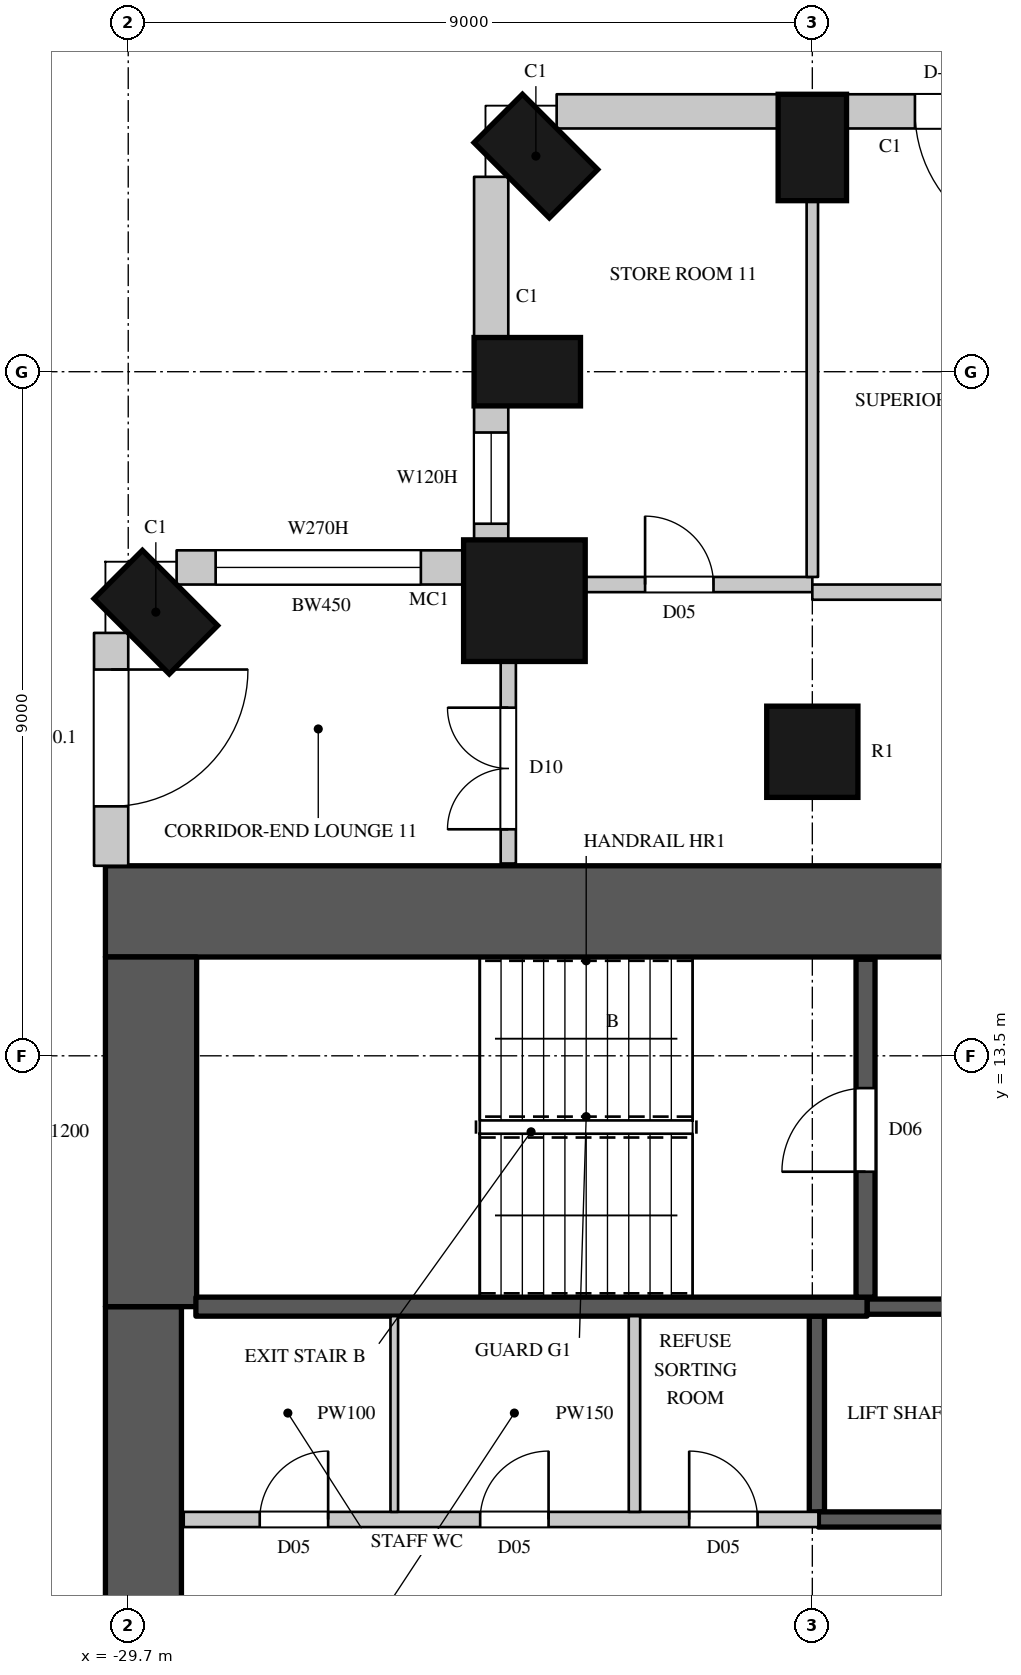
"""IFC4 building model, lengths in metres.
Left out: names, types, materials, properties, quantities, classifications, styles, units other than length and angle.
Written with IfcOpenShell. Run it as: python <this file> out.ifc"""

import sys

from ifc_helpers import new_model, si_unit, direction, frame, frame_2d, origin, origin_2d, place, context, subcontext, project, spatial, rectangle, circle, extrude, element, fill, save


model = new_model("IFC4")
c1 = context("Model", 3, precision=1e-05, world=origin(), true_north=direction((0.0, 1.0)))
c2 = subcontext(c1, "Body", "Model", "MODEL_VIEW")
j1 = project(units=[si_unit("LENGTHUNIT", "METRE"), si_unit("PLANEANGLEUNIT", "RADIAN")], contexts=[c1])
p1 = place(None, origin())
s1 = spatial("IfcSite", under=j1, at=p1, CompositionType="ELEMENT")
p2 = place(p1, origin())
s2 = spatial("IfcBuilding", under=s1, at=p2, CompositionType="ELEMENT")
p3 = place(p2, frame((0.0, 0.0, 69.9)))
s3 = spatial("IfcBuildingStorey", under=s2, at=p3, CompositionType="ELEMENT", Elevation=69.9)
for number, where, z_axis, x_axis in (
    (1, (-29.337, 19.337, 0.0), (0.0, 0.0, 1.0), (-0.707, -0.707, 0.0)),
    (2, (-20.7, 25.45, 0.0), (0.0, 0.0, 1.0), (-1.0, 0.0, 0.0)),
    (3, (-24.337, 25.337, 0.0), (0.0, 0.0, 1.0), (-0.707, -0.707, 0.0)),
    (4, (-24.45, 22.5, 0.0), (0.0, 0.0, 1.0), (0.0, -1.0, 0.0)),
):
    element("IfcColumn", number, at=place(p3, frame(where, z_axis=z_axis, x_axis=x_axis)), inside=s3, PredefinedType="COLUMN", context=c2, shape_type="SweptSolid", body=[
        extrude(rectangle(XDim=0.9, YDim=1.4, at=origin_2d()), origin(), (0.0, 0.0, 1.0), 3.6),
    ])
p4 = place(p3, frame((-24.488, 19.488, 0.0), z_axis=(0.0, 0.0, 1.0), x_axis=(1.0, 0.0, 0.0)))
e5 = element("IfcColumn", 5, at=p4, inside=s3, PredefinedType="COLUMN", context=c2, shape_type="SweptSolid", body=[
    extrude(circle(Radius=0.8, at=origin_2d()), origin(), (0.0, 0.0, 1.0), 3.6),
])
p5 = place(p3, frame((-20.7, 17.5, 0.0), z_axis=(0.0, 0.0, 1.0), x_axis=(1.0, 0.0, 0.0)))
e6 = element("IfcColumn", 6, at=p5, inside=s3, PredefinedType="COLUMN", context=c2, shape_type="SweptSolid", body=[
    extrude(circle(Radius=0.6, at=origin_2d()), origin(), (0.0, 0.0, 1.0), 3.6),
])
p6 = place(p3, frame((-29.925, 19.064, 0.0), z_axis=(0.0, 0.0, 1.0), x_axis=(0.0, -1.0, 0.0)))
e7 = element("IfcWall", 7, at=p6, inside=s3, PredefinedType="SOLIDWALL", context=c2, shape_type="SweptSolid", body=[
    extrude(rectangle(XDim=3.064, YDim=0.45, at=frame_2d((1.532, 0.0))), origin(), (0.0, 0.0, 1.0), 3.3),
])
p7 = place(p6, frame((0.482, 0.0, 0.0)))
e8 = element("IfcOpeningElement", 8, at=p7, cuts=e7, PredefinedType="OPENING", context=c2, shape_type="SweptSolid", body=[
    extrude(rectangle(XDim=1.8, YDim=2.4, at=frame_2d((0.9, 1.2))), frame((0.0, 0.235, 0.0), z_axis=(0.0, -1.0, 0.0), x_axis=(1.0, 0.0, 0.0)), (0.0, 0.0, 1.0), 0.47),
])
p8 = place(p3, frame((-12.15, 25.925, 0.0), z_axis=(0.0, 0.0, 1.0), x_axis=(-1.0, 0.0, 0.0)))
e9 = element("IfcWall", 9, at=p8, inside=s3, PredefinedType="SOLIDWALL", context=c2, shape_type="SweptSolid", body=[
    extrude(rectangle(XDim=8.1, YDim=0.45, at=frame_2d((4.05, 0.0))), origin(), (0.0, 0.0, 1.0), 3.3),
])
p9 = place(p8, frame((0.2, 0.0, 0.0)))
e10 = element("IfcOpeningElement", 10, at=p9, cuts=e9, PredefinedType="OPENING", context=c2, shape_type="SweptSolid", body=[
    extrude(rectangle(XDim=1.8, YDim=2.4, at=frame_2d((0.9, 1.2))), frame((0.0, 0.235, 0.0), z_axis=(0.0, -1.0, 0.0), x_axis=(1.0, 0.0, 0.0)), (0.0, 0.0, 1.0), 0.47),
])
p10 = place(p8, frame((2.2, 0.0, 1.05)))
e11 = element("IfcOpeningElement", 11, at=p10, cuts=e9, PredefinedType="OPENING", context=c2, shape_type="SweptSolid", body=[
    extrude(rectangle(XDim=1.2, YDim=2.0, at=frame_2d((0.6, 1.0))), frame((0.0, 0.235, 0.0), z_axis=(0.0, -1.0, 0.0), x_axis=(1.0, 0.0, 0.0)), (0.0, 0.0, 1.0), 0.47),
])
p11 = place(p8, frame((5.4, 0.0, 0.0)))
e12 = element("IfcOpeningElement", 12, at=p11, cuts=e9, PredefinedType="OPENING", context=c2, shape_type="SweptSolid", body=[
    extrude(rectangle(XDim=1.8, YDim=2.4, at=frame_2d((0.9, 1.2))), frame((0.0, 0.235, 0.0), z_axis=(0.0, -1.0, 0.0), x_axis=(1.0, 0.0, 0.0)), (0.0, 0.0, 1.0), 0.47),
])
p12 = place(p3, frame((-21.15, 25.925, 0.0), z_axis=(0.0, 0.0, 1.0), x_axis=(-1.0, 0.0, 0.0)))
e13 = element("IfcWall", 13, at=p12, inside=s3, PredefinedType="SOLIDWALL", context=c2, shape_type="SweptSolid", body=[
    extrude(rectangle(XDim=2.914, YDim=0.45, at=frame_2d((1.457, 0.0))), origin(), (0.0, 0.0, 1.0), 3.3),
])
p13 = place(p3, frame((-24.925, 25.064, 0.0), z_axis=(0.0, 0.0, 1.0), x_axis=(0.0, -1.0, 0.0)))
e14 = element("IfcWall", 14, at=p13, inside=s3, PredefinedType="SOLIDWALL", context=c2, shape_type="SweptSolid", body=[
    extrude(rectangle(XDim=2.114, YDim=0.45, at=frame_2d((1.057, 0.0))), origin(), (0.0, 0.0, 1.0), 3.3),
])
p14 = place(p3, frame((-24.925, 22.05, 0.0), z_axis=(0.0, 0.0, 1.0), x_axis=(0.0, -1.0, 0.0)))
e15 = element("IfcWall", 15, at=p14, inside=s3, PredefinedType="SOLIDWALL", context=c2, shape_type="SweptSolid", body=[
    extrude(rectangle(XDim=1.792, YDim=0.45, at=frame_2d((0.896, 0.0))), origin(), (0.0, 0.0, 1.0), 3.3),
])
p15 = place(p14, frame((0.35, 0.0, 1.05)))
e16 = element("IfcOpeningElement", 16, at=p15, cuts=e15, PredefinedType="OPENING", context=c2, shape_type="SweptSolid", body=[
    extrude(rectangle(XDim=1.2, YDim=2.0, at=frame_2d((0.6, 1.0))), frame((0.0, 0.235, 0.0), z_axis=(0.0, -1.0, 0.0), x_axis=(1.0, 0.0, 0.0)), (0.0, 0.0, 1.0), 0.47),
])
p16 = place(p3, frame((-25.259, 19.925, 0.0), z_axis=(0.0, 0.0, 1.0), x_axis=(-1.0, 0.0, 0.0)))
e17 = element("IfcWall", 17, at=p16, inside=s3, PredefinedType="SOLIDWALL", context=c2, shape_type="SweptSolid", body=[
    extrude(rectangle(XDim=3.805, YDim=0.45, at=frame_2d((1.903, 0.0))), origin(), (0.0, 0.0, 1.0), 3.3),
])
p17 = place(p16, frame((0.592, 0.0, 1.05)))
e18 = element("IfcOpeningElement", 18, at=p17, cuts=e17, PredefinedType="OPENING", context=c2, shape_type="SweptSolid", body=[
    extrude(rectangle(XDim=2.7, YDim=2.0, at=frame_2d((1.35, 1.0))), frame((0.0, 0.235, 0.0), z_axis=(0.0, -1.0, 0.0), x_axis=(1.0, 0.0, 0.0)), (0.0, 0.0, 1.0), 0.47),
])
p18 = place(p3, frame((-30.0, 15.4, 0.0), z_axis=(0.0, 0.0, 1.0), x_axis=(1.0, 0.0, 0.0)))
e19 = element("IfcWall", 19, at=p18, inside=s3, PredefinedType="SHEAR", context=c2, shape_type="SweptSolid", body=[
    extrude(rectangle(XDim=16.0, YDim=1.2, at=frame_2d((8.0, 0.0))), origin(), (0.0, 0.0, 1.0), 3.6),
])
p19 = place(p18, frame((13.4, 0.0, 0.0)))
e20 = element("IfcOpeningElement", 20, at=p19, cuts=e19, PredefinedType="OPENING", context=c2, shape_type="SweptSolid", body=[
    extrude(rectangle(XDim=1.5, YDim=2.4, at=frame_2d((0.75, 1.2))), frame((0.0, 0.61, 0.0), z_axis=(0.0, -1.0, 0.0), x_axis=(1.0, 0.0, 0.0)), (0.0, 0.0, 1.0), 1.22),
])
p20 = place(p3, frame((-29.5, -10.2, 0.0), z_axis=(0.0, 0.0, 1.0), x_axis=(0.0, 1.0, 0.0)))
e21 = element("IfcWall", 21, at=p20, inside=s3, PredefinedType="SHEAR", context=c2, shape_type="SweptSolid", body=[
    extrude(rectangle(XDim=20.4, YDim=1.0, at=frame_2d((10.2, 0.0))), origin(), (0.0, 0.0, 1.0), 3.6),
])
p21 = place(p3, frame((-29.4, 10.2, 0.0), z_axis=(0.0, 0.0, 1.0), x_axis=(0.0, 1.0, 0.0)))
e22 = element("IfcWall", 22, at=p21, inside=s3, PredefinedType="SHEAR", context=c2, shape_type="SweptSolid", body=[
    extrude(rectangle(XDim=4.6, YDim=1.2, at=frame_2d((2.3, 0.0))), origin(), (0.0, 0.0, 1.0), 3.6),
])
p22 = place(p3, frame((-28.97, 7.4, 0.0), z_axis=(0.0, 0.0, 1.0), x_axis=(1.0, 0.0, 0.0)))
e23 = element("IfcWall", 23, at=p22, inside=s3, PredefinedType="PARTITIONING", context=c2, shape_type="SweptSolid", body=[
    extrude(rectangle(XDim=8.35, YDim=0.2, at=frame_2d((4.175, 0.0))), origin(), (0.0, 0.0, 1.0), 3.3),
])
p23 = place(p22, frame((1.0, 0.0, 0.0)))
e24 = element("IfcOpeningElement", 24, at=p23, cuts=e23, PredefinedType="OPENING", context=c2, shape_type="SweptSolid", body=[
    extrude(rectangle(XDim=0.9, YDim=2.2, at=frame_2d((0.45, 1.1))), frame((0.0, 0.11, 0.0), z_axis=(0.0, -1.0, 0.0), x_axis=(1.0, 0.0, 0.0)), (0.0, 0.0, 1.0), 0.22),
])
p24 = place(p22, frame((3.9, 0.0, 0.0)))
e25 = element("IfcOpeningElement", 25, at=p24, cuts=e23, PredefinedType="OPENING", context=c2, shape_type="SweptSolid", body=[
    extrude(rectangle(XDim=0.9, YDim=2.2, at=frame_2d((0.45, 1.1))), frame((0.0, 0.11, 0.0), z_axis=(0.0, -1.0, 0.0), x_axis=(1.0, 0.0, 0.0)), (0.0, 0.0, 1.0), 0.22),
])
p25 = place(p22, frame((6.65, 0.0, 0.0)))
e26 = element("IfcOpeningElement", 26, at=p25, cuts=e23, PredefinedType="OPENING", context=c2, shape_type="SweptSolid", body=[
    extrude(rectangle(XDim=0.9, YDim=2.2, at=frame_2d((0.45, 1.1))), frame((0.0, 0.11, 0.0), z_axis=(0.0, -1.0, 0.0), x_axis=(1.0, 0.0, 0.0)), (0.0, 0.0, 1.0), 0.22),
])
p26 = place(p3, frame((-24.7, 16.03, 0.0), z_axis=(0.0, 0.0, 1.0), x_axis=(0.0, 1.0, 0.0)))
e27 = element("IfcWall", 27, at=p26, inside=s3, PredefinedType="PARTITIONING", context=c2, shape_type="SweptSolid", body=[
    extrude(rectangle(XDim=2.67, YDim=0.2, at=frame_2d((1.335, 0.0))), origin(), (0.0, 0.0, 1.0), 3.3),
])
p27 = place(p26, frame((0.45, 0.0, 0.0)))
e28 = element("IfcOpeningElement", 28, at=p27, cuts=e27, PredefinedType="OPENING", context=c2, shape_type="SweptSolid", body=[
    extrude(rectangle(XDim=1.6, YDim=2.4, at=frame_2d((0.8, 1.2))), frame((0.0, 0.11, 0.0), z_axis=(0.0, -1.0, 0.0), x_axis=(1.0, 0.0, 0.0)), (0.0, 0.0, 1.0), 0.22),
])
p28 = place(p3, frame((-23.7, 19.7, 0.0), z_axis=(0.0, 0.0, 1.0), x_axis=(1.0, 0.0, 0.0)))
e29 = element("IfcWall", 29, at=p28, inside=s3, PredefinedType="PARTITIONING", context=c2, shape_type="SweptSolid", body=[
    extrude(rectangle(XDim=3.0, YDim=0.2, at=frame_2d((1.5, 0.0))), origin(), (0.0, 0.0, 1.0), 3.3),
])
p29 = place(p28, frame((0.8, 0.0, 0.0)))
e30 = element("IfcOpeningElement", 30, at=p29, cuts=e29, PredefinedType="OPENING", context=c2, shape_type="SweptSolid", body=[
    extrude(rectangle(XDim=0.9, YDim=2.2, at=frame_2d((0.45, 1.1))), frame((0.0, 0.11, 0.0), z_axis=(0.0, -1.0, 0.0), x_axis=(1.0, 0.0, 0.0)), (0.0, 0.0, 1.0), 0.22),
])
p30 = place(p3, frame((-20.7, 19.6, 0.0), z_axis=(0.0, 0.0, 1.0), x_axis=(1.0, 0.0, 0.0)))
e31 = element("IfcWall", 31, at=p30, inside=s3, PredefinedType="PARTITIONING", context=c2, shape_type="SweptSolid", body=[
    extrude(rectangle(XDim=38.184, YDim=0.2, at=frame_2d((19.092, 0.0))), origin(), (0.0, 0.0, 1.0), 3.3),
])
p31 = place(p30, frame((3.15, 0.0, 0.0)))
e32 = element("IfcOpeningElement", 32, at=p31, cuts=e31, PredefinedType="OPENING", context=c2, shape_type="SweptSolid", body=[
    extrude(rectangle(XDim=0.95, YDim=2.2, at=frame_2d((0.475, 1.1))), frame((0.0, 0.11, 0.0), z_axis=(0.0, -1.0, 0.0), x_axis=(1.0, 0.0, 0.0)), (0.0, 0.0, 1.0), 0.22),
])
p32 = place(p30, frame((13.9, 0.0, 0.0)))
e33 = element("IfcOpeningElement", 33, at=p32, cuts=e31, PredefinedType="OPENING", context=c2, shape_type="SweptSolid", body=[
    extrude(rectangle(XDim=0.95, YDim=2.2, at=frame_2d((0.475, 1.1))), frame((0.0, 0.11, 0.0), z_axis=(0.0, -1.0, 0.0), x_axis=(1.0, 0.0, 0.0)), (0.0, 0.0, 1.0), 0.22),
])
p33 = place(p30, frame((21.15, 0.0, 0.0)))
e34 = element("IfcOpeningElement", 34, at=p33, cuts=e31, PredefinedType="OPENING", context=c2, shape_type="SweptSolid", body=[
    extrude(rectangle(XDim=0.95, YDim=2.2, at=frame_2d((0.475, 1.1))), frame((0.0, 0.11, 0.0), z_axis=(0.0, -1.0, 0.0), x_axis=(1.0, 0.0, 0.0)), (0.0, 0.0, 1.0), 0.22),
])
p34 = place(p30, frame((31.9, 0.0, 0.0)))
e35 = element("IfcOpeningElement", 35, at=p34, cuts=e31, PredefinedType="OPENING", context=c2, shape_type="SweptSolid", body=[
    extrude(rectangle(XDim=0.95, YDim=2.2, at=frame_2d((0.475, 1.1))), frame((0.0, 0.11, 0.0), z_axis=(0.0, -1.0, 0.0), x_axis=(1.0, 0.0, 0.0)), (0.0, 0.0, 1.0), 0.22),
])
p35 = place(p30, frame((36.85, 0.0, 0.0)))
e36 = element("IfcOpeningElement", 36, at=p35, cuts=e31, PredefinedType="OPENING", context=c2, shape_type="SweptSolid", body=[
    extrude(rectangle(XDim=0.95, YDim=2.2, at=frame_2d((0.475, 1.1))), frame((0.0, 0.11, 0.0), z_axis=(0.0, -1.0, 0.0), x_axis=(1.0, 0.0, 0.0)), (0.0, 0.0, 1.0), 0.22),
])
p36 = place(p3, frame((-23.04, 7.5, 0.0), z_axis=(0.0, 0.0, 1.0), x_axis=(0.0, 1.0, 0.0)))
e37 = element("IfcWall", 37, at=p36, inside=s3, PredefinedType="PARTITIONING", context=c2, shape_type="SweptSolid", body=[
    extrude(rectangle(XDim=2.575, YDim=0.15, at=frame_2d((1.288, 0.0))), origin(), (0.0, 0.0, 1.0), 3.3),
])
p37 = place(p3, frame((-20.7, 19.8, 0.0), z_axis=(0.0, 0.0, 1.0), x_axis=(0.0, 1.0, 0.0)))
e38 = element("IfcWall", 38, at=p37, inside=s3, PredefinedType="PARTITIONING", context=c2, shape_type="SweptSolid", body=[
    extrude(rectangle(XDim=4.95, YDim=0.15, at=frame_2d((2.475, 0.0))), origin(), (0.0, 0.0, 1.0), 2.75),
])
p38 = place(p3, frame((-20.64, 7.5, 0.0), z_axis=(0.0, 0.0, 1.0), x_axis=(0.0, 1.0, 0.0)))
e39 = element("IfcWall", 39, at=p38, inside=s3, PredefinedType="SHEAR", context=c2, shape_type="SweptSolid", body=[
    extrude(rectangle(XDim=2.575, YDim=0.2, at=frame_2d((1.288, 0.0))), origin(), (0.0, 0.0, 1.0), 3.3),
])
p39 = place(p3, frame((-20.62, 7.4, 0.0), z_axis=(0.0, 0.0, 1.0), x_axis=(1.0, 0.0, 0.0)))
e40 = element("IfcWall", 40, at=p39, inside=s3, PredefinedType="SHEAR", context=c2, shape_type="SweptSolid", body=[
    extrude(rectangle(XDim=5.59, YDim=0.2, at=frame_2d((2.795, 0.0))), origin(), (0.0, 0.0, 1.0), 3.3),
])
p40 = place(p3, frame((-19.98, 10.2, 0.0), z_axis=(0.0, 0.0, 1.0), x_axis=(1.0, 0.0, 0.0)))
e41 = element("IfcWall", 41, at=p40, inside=s3, PredefinedType="SHEAR", context=c2, shape_type="SweptSolid", body=[
    extrude(rectangle(XDim=4.95, YDim=0.2, at=frame_2d((2.475, 0.0))), origin(), (0.0, 0.0, 1.0), 3.3),
])
p41 = place(p40, frame((2.95, 0.0, 0.0)))
e42 = element("IfcOpeningElement", 42, at=p41, cuts=e41, PredefinedType="OPENING", context=c2, shape_type="SweptSolid", body=[
    extrude(rectangle(XDim=1.1, YDim=2.2, at=frame_2d((0.55, 1.1))), frame((0.0, 0.11, 0.0), z_axis=(0.0, -1.0, 0.0), x_axis=(1.0, 0.0, 0.0)), (0.0, 0.0, 1.0), 0.22),
])
p42 = place(p3, frame((-28.81, 10.2, 0.0), z_axis=(0.0, 0.0, 1.0), x_axis=(1.0, 0.0, 0.0)))
e43 = element("IfcWall", 43, at=p42, inside=s3, PredefinedType="SHEAR", context=c2, shape_type="SweptSolid", body=[
    extrude(rectangle(XDim=8.83, YDim=0.25, at=frame_2d((4.415, 0.0))), origin(), (0.0, 0.0, 1.0), 3.3),
])
p43 = place(p3, frame((-20.0, 10.325, 0.0), z_axis=(0.0, 0.0, 1.0), x_axis=(0.0, 1.0, 0.0)))
e44 = element("IfcWall", 44, at=p43, inside=s3, PredefinedType="SHEAR", context=c2, shape_type="SweptSolid", body=[
    extrude(rectangle(XDim=4.445, YDim=0.25, at=frame_2d((2.223, 0.0))), origin(), (0.0, 0.0, 1.0), 3.3),
])
p44 = place(p43, frame((1.65, 0.0, 0.0)))
e45 = element("IfcOpeningElement", 45, at=p44, cuts=e44, PredefinedType="OPENING", context=c2, shape_type="SweptSolid", body=[
    extrude(rectangle(XDim=1.1, YDim=2.2, at=frame_2d((0.55, 1.1))), frame((0.0, 0.135, 0.0), z_axis=(0.0, -1.0, 0.0), x_axis=(1.0, 0.0, 0.0)), (0.0, 0.0, 1.0), 0.27),
])
p45 = place(p3, frame((-26.2, 7.5, 0.0), z_axis=(0.0, 0.0, 1.0), x_axis=(0.0, 1.0, 0.0)))
e46 = element("IfcWall", 46, at=p45, inside=s3, PredefinedType="PARTITIONING", context=c2, shape_type="SweptSolid", body=[
    extrude(rectangle(XDim=2.575, YDim=0.1, at=frame_2d((1.288, 0.0))), origin(), (0.0, 0.0, 1.0), 3.3),
])
p46 = place(p7, origin())
e47 = element("IfcDoor", 47, at=p46, inside=s3, OperationType="SLIDING_TO_LEFT", PredefinedType="DOOR", context=c2, shape_type="SweptSolid", body=[
    extrude(rectangle(XDim=1.8, YDim=2.4, at=frame_2d((0.9, 1.2))), frame((0.0, 0.13, 0.0), z_axis=(0.0, -1.0, 0.0), x_axis=(1.0, 0.0, 0.0)), (0.0, 0.0, 1.0), 0.05),
])
fill(e8, e47)
p47 = place(p11, origin())
e48 = element("IfcDoor", 48, at=p47, inside=s3, OperationType="SLIDING_TO_LEFT", PredefinedType="DOOR", context=c2, shape_type="SweptSolid", body=[
    extrude(rectangle(XDim=1.8, YDim=2.4, at=frame_2d((0.9, 1.2))), frame((0.0, 0.13, 0.0), z_axis=(0.0, -1.0, 0.0), x_axis=(1.0, 0.0, 0.0)), (0.0, 0.0, 1.0), 0.05),
])
fill(e12, e48)
p48 = place(p15, origin())
e49 = element("IfcWindow", 49, at=p48, inside=s3, PartitioningType="SINGLE_PANEL", PredefinedType="WINDOW", context=c2, shape_type="SweptSolid", body=[
    extrude(rectangle(XDim=1.2, YDim=2.0, at=frame_2d((0.6, 1.0))), frame((0.0, 0.135, 0.0), z_axis=(0.0, -1.0, 0.0), x_axis=(1.0, 0.0, 0.0)), (0.0, 0.0, 1.0), 0.06),
])
fill(e16, e49)
p49 = place(p17, origin())
e50 = element("IfcWindow", 50, at=p49, inside=s3, PartitioningType="SINGLE_PANEL", PredefinedType="WINDOW", context=c2, shape_type="SweptSolid", body=[
    extrude(rectangle(XDim=2.7, YDim=2.0, at=frame_2d((1.35, 1.0))), frame((0.0, 0.135, 0.0), z_axis=(0.0, -1.0, 0.0), x_axis=(1.0, 0.0, 0.0)), (0.0, 0.0, 1.0), 0.06),
])
fill(e18, e50)
p50 = place(p44, origin())
e51 = element("IfcDoor", 51, at=p50, inside=s3, OperationType="SINGLE_SWING_LEFT", PredefinedType="DOOR", context=c2, shape_type="SweptSolid", body=[
    extrude(rectangle(XDim=1.1, YDim=2.2, at=frame_2d((0.55, 1.1))), frame((0.0, 0.025, 0.0), z_axis=(0.0, -1.0, 0.0), x_axis=(1.0, 0.0, 0.0)), (0.0, 0.0, 1.0), 0.05),
])
fill(e45, e51)
p51 = place(p23, origin())
e52 = element("IfcDoor", 52, at=p51, inside=s3, OperationType="SINGLE_SWING_RIGHT", PredefinedType="DOOR", context=c2, shape_type="SweptSolid", body=[
    extrude(rectangle(XDim=0.9, YDim=2.2, at=frame_2d((0.45, 1.1))), frame((0.0, 0.025, 0.0), z_axis=(0.0, -1.0, 0.0), x_axis=(1.0, 0.0, 0.0)), (0.0, 0.0, 1.0), 0.05),
])
fill(e24, e52)
p52 = place(p24, origin())
e53 = element("IfcDoor", 53, at=p52, inside=s3, OperationType="SINGLE_SWING_RIGHT", PredefinedType="DOOR", context=c2, shape_type="SweptSolid", body=[
    extrude(rectangle(XDim=0.9, YDim=2.2, at=frame_2d((0.45, 1.1))), frame((0.0, 0.025, 0.0), z_axis=(0.0, -1.0, 0.0), x_axis=(1.0, 0.0, 0.0)), (0.0, 0.0, 1.0), 0.05),
])
fill(e25, e53)
p53 = place(p25, origin())
e54 = element("IfcDoor", 54, at=p53, inside=s3, OperationType="SINGLE_SWING_LEFT", PredefinedType="DOOR", context=c2, shape_type="SweptSolid", body=[
    extrude(rectangle(XDim=0.9, YDim=2.2, at=frame_2d((0.45, 1.1))), frame((0.0, 0.025, 0.0), z_axis=(0.0, -1.0, 0.0), x_axis=(1.0, 0.0, 0.0)), (0.0, 0.0, 1.0), 0.05),
])
fill(e26, e54)
p54 = place(p29, origin())
e55 = element("IfcDoor", 55, at=p54, inside=s3, OperationType="SINGLE_SWING_LEFT", PredefinedType="DOOR", context=c2, shape_type="SweptSolid", body=[
    extrude(rectangle(XDim=0.9, YDim=2.2, at=frame_2d((0.45, 1.1))), frame((0.0, 0.025, 0.0), z_axis=(0.0, -1.0, 0.0), x_axis=(1.0, 0.0, 0.0)), (0.0, 0.0, 1.0), 0.05),
])
fill(e30, e55)
p55 = place(p27, origin())
e56 = element("IfcDoor", 56, at=p55, inside=s3, OperationType="DOUBLE_DOOR_SINGLE_SWING", PredefinedType="DOOR", context=c2, shape_type="SweptSolid", body=[
    extrude(rectangle(XDim=1.6, YDim=2.4, at=frame_2d((0.8, 1.2))), frame((0.0, 0.025, 0.0), z_axis=(0.0, -1.0, 0.0), x_axis=(1.0, 0.0, 0.0)), (0.0, 0.0, 1.0), 0.05),
])
fill(e28, e56)
save(model, sys.argv[1])
